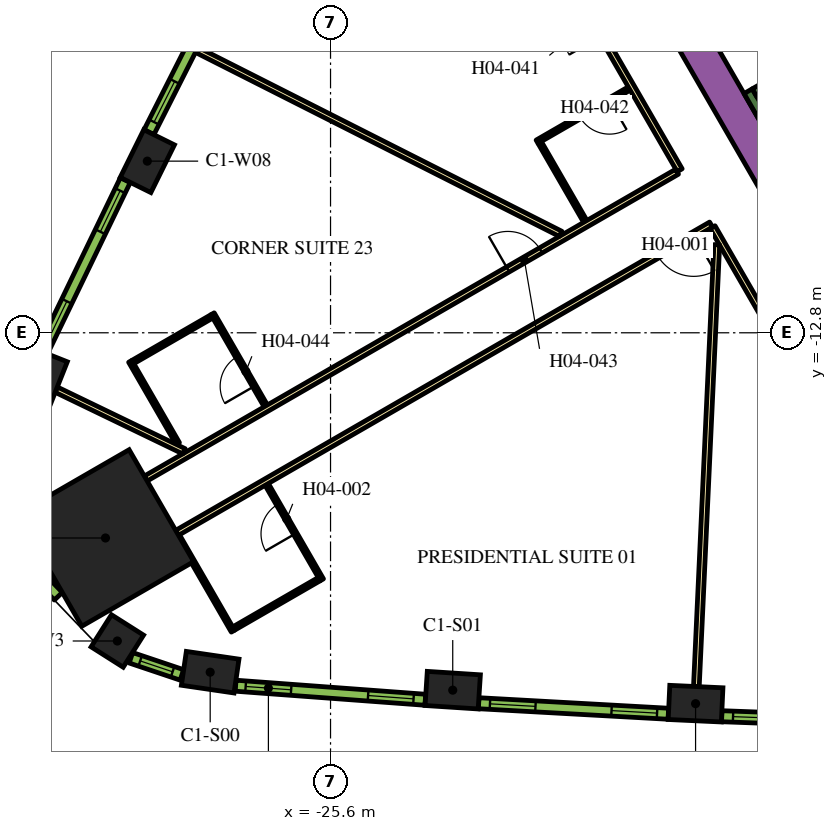
"""IFC4 building model, lengths in metres.
Left out: names, types, materials, properties, quantities, classifications, styles, units other than length and angle.
Written with IfcOpenShell. Run it as: python <this file> out.ifc"""

import sys

from ifc_helpers import new_model, si_unit, direction, frame, frame_2d, origin, origin_2d, place, context, subcontext, project, spatial, rectangle, extrude, element, fill, save


model = new_model("IFC4")
c1 = context("Model", 3, precision=1e-05, world=origin(), true_north=direction((0.0, 1.0)))
c2 = subcontext(c1, "Body", "Model", "MODEL_VIEW")
j1 = project(units=[si_unit("LENGTHUNIT", "METRE"), si_unit("PLANEANGLEUNIT", "RADIAN")], contexts=[c1])
p1 = place(None, origin())
s1 = spatial("IfcSite", under=j1, at=p1, CompositionType="ELEMENT")
p2 = place(p1, origin())
s2 = spatial("IfcBuilding", under=s1, at=p2, CompositionType="ELEMENT")
p3 = place(p2, frame((0.0, 0.0, 62.7)))
s3 = spatial("IfcBuildingStorey", under=s2, at=p3, CompositionType="ELEMENT", Elevation=62.7)
p4 = place(p3, frame((-31.522, -18.199, 0.0), z_axis=(0.0, 0.0, 1.0), x_axis=(-0.866025403784, -0.5, 0.0)))
e1 = element("IfcColumn", 1, at=p4, inside=s3, PredefinedType="COLUMN", context=c2, shape_type="SweptSolid", body=[
    extrude(rectangle(XDim=3.4, YDim=3.4, at=origin_2d()), origin(), (0.0, 0.0, 1.0), 3.9),
])
for number, where, z_axis, x_axis in (
    (2, (-28.767, -21.731, 0.0), (0.0, 0.0, 1.0), (0.989, -0.145, 0.0)),
    (3, (-22.385, -22.204, 0.0), (0.0, 0.0, 1.0), (0.998, -0.065, 0.0)),
    (4, (-15.994, -22.558, 0.0), (0.0, 0.0, 1.0), (0.999, -0.046, 0.0)),
    (5, (-30.421, -8.284, 0.0), (0.0, 0.0, 1.0), (-0.443, -0.897, 0.0)),
    (6, (-33.203, -14.047, 0.0), (0.0, 0.0, 1.0), (-0.369, -0.929, 0.0)),
):
    element("IfcColumn", number, at=place(p3, frame(where, z_axis=z_axis, x_axis=x_axis)), inside=s3, PredefinedType="COLUMN", context=c2, shape_type="SweptSolid", body=[
        extrude(rectangle(XDim=1.4, YDim=0.9, at=origin_2d()), origin(), (0.0, 0.0, 1.0), 3.9),
    ])
p5 = place(p3, frame((-31.21, -20.91, 0.0), z_axis=(0.0, 0.0, 1.0), x_axis=(0.844485001826, -0.535579202071, 0.0)))
e7 = element("IfcColumn", 7, at=p5, inside=s3, PredefinedType="COLUMN", context=c2, shape_type="SweptSolid", body=[
    extrude(rectangle(XDim=1.0, YDim=1.0, at=origin_2d()), origin(), (0.0, 0.0, 1.0), 3.9),
])
p6 = place(p3, frame((-12.134, -11.883, 0.0), z_axis=(0.0, 0.0, 1.0), x_axis=(-0.500005339912, 0.866022320763, 0.0)))
e8 = element("IfcWall", 8, at=p6, inside=s3, PredefinedType="SOLIDWALL", context=c2, shape_type="SweptSolid", body=[
    extrude(rectangle(XDim=9.488, YDim=0.9, at=frame_2d((4.744, 0.0))), origin(), (0.0, 0.0, 1.0), 3.9),
])
p7 = place(p3, frame((-12.885, -9.431, 0.0), z_axis=(0.0, 0.0, 1.0), x_axis=(-0.500020560727, 0.866013532718, 0.0)))
e9 = element("IfcWall", 9, at=p7, inside=s3, PredefinedType="SOLIDWALL", context=c2, shape_type="SweptSolid", body=[
    extrude(rectangle(XDim=3.45, YDim=0.25, at=frame_2d((1.725, 0.0))), origin(), (0.0, 0.0, 1.0), 3.9),
])
p8 = place(p3, frame((-14.44, -6.49, 0.0), z_axis=(0.0, 0.0, 1.0), x_axis=(0.866022966069, 0.500004222222, 0.0)))
e10 = element("IfcWall", 10, at=p8, inside=s3, PredefinedType="SOLIDWALL", context=c2, shape_type="SweptSolid", body=[
    extrude(rectangle(XDim=6.8, YDim=0.25, at=frame_2d((3.4, 0.0))), origin(), (0.0, 0.0, 1.0), 3.9),
])
p9 = place(p3, frame((-16.412, -8.523, 0.0), z_axis=(0.0, 0.0, 1.0), x_axis=(-0.500001929737, 0.866024289647, 0.0)))
e11 = element("IfcWall", 11, at=p9, inside=s3, PredefinedType="PARTITIONING", context=c2, shape_type="SweptSolid", body=[
    extrude(rectangle(XDim=5.268, YDim=0.15, at=frame_2d((2.634, 0.0))), origin(), (0.0, 0.0, 1.0), 2.75),
])
p10 = place(p9, frame((4.088, 0.0, 0.0)))
e12 = element("IfcOpeningElement", 12, at=p10, cuts=e11, PredefinedType="OPENING", context=c2, shape_type="SweptSolid", body=[
    extrude(rectangle(XDim=1.0, YDim=2.1, at=frame_2d((0.5, 1.05))), frame((0.0, 0.085, 0.0), z_axis=(0.0, -1.0, 0.0), x_axis=(1.0, 0.0, 0.0)), (0.0, 0.0, 1.0), 0.17),
])
p11 = place(p3, frame((-30.463, -16.635, 0.0), z_axis=(0.0, 0.0, 1.0), x_axis=(0.866022394896, 0.500005211512, 0.0)))
e13 = element("IfcWall", 13, at=p11, inside=s3, PredefinedType="PARTITIONING", context=c2, shape_type="SweptSolid", body=[
    extrude(rectangle(XDim=16.144, YDim=0.15, at=frame_2d((8.072, 0.0))), origin(), (0.0, 0.0, 1.0), 2.75),
])
p12 = place(p11, frame((11.004, 0.0, 0.0)))
e14 = element("IfcOpeningElement", 14, at=p12, cuts=e13, PredefinedType="OPENING", context=c2, shape_type="SweptSolid", body=[
    extrude(rectangle(XDim=1.0, YDim=2.1, at=frame_2d((0.5, 1.05))), frame((0.0, 0.085, 0.0), z_axis=(0.0, -1.0, 0.0), x_axis=(1.0, 0.0, 0.0)), (0.0, 0.0, 1.0), 0.17),
])
p13 = place(p3, frame((-15.587, -9.952, 0.0), z_axis=(0.0, 0.0, 1.0), x_axis=(-0.866022197818, -0.500005552856, 0.0)))
e15 = element("IfcWall", 15, at=p13, inside=s3, PredefinedType="PARTITIONING", context=c2, shape_type="SweptSolid", body=[
    extrude(rectangle(XDim=16.224, YDim=0.15, at=frame_2d((8.112, 0.0))), origin(), (0.0, 0.0, 1.0), 2.75),
])
p14 = place(p13, frame((0.527, 0.0, 0.0)))
e16 = element("IfcOpeningElement", 16, at=p14, cuts=e15, PredefinedType="OPENING", context=c2, shape_type="SweptSolid", body=[
    extrude(rectangle(XDim=1.1, YDim=2.1, at=frame_2d((0.55, 1.05))), frame((0.0, 0.085, 0.0), z_axis=(0.0, -1.0, 0.0), x_axis=(1.0, 0.0, 0.0)), (0.0, 0.0, 1.0), 0.17),
])
p15 = place(p3, frame((-12.918, -14.575, 0.0), z_axis=(0.0, 0.0, 1.0), x_axis=(-0.500009150678, 0.866020120573, 0.0)))
e17 = element("IfcWall", 17, at=p15, inside=s3, PredefinedType="PARTITIONING", context=c2, shape_type="SweptSolid", body=[
    extrude(rectangle(XDim=5.258, YDim=0.15, at=frame_2d((2.629, 0.0))), origin(), (0.0, 0.0, 1.0), 2.75),
])
p16 = place(p3, frame((-32.817, -14.296, 0.0), z_axis=(0.0, 0.0, 1.0), x_axis=(0.900616957918, -0.434613730927, 0.0)))
e18 = element("IfcWall", 18, at=p16, inside=s3, PredefinedType="PARTITIONING", context=c2, shape_type="SweptSolid", body=[
    extrude(rectangle(XDim=3.733, YDim=0.15, at=frame_2d((1.867, 0.0))), origin(), (0.0, 0.0, 1.0), 2.75),
])
p17 = place(p3, frame((-29.12, -5.356, 0.0), z_axis=(0.0, 0.0, 1.0), x_axis=(0.892401965553, -0.451241323327, 0.0)))
e19 = element("IfcWall", 19, at=p17, inside=s3, PredefinedType="PARTITIONING", context=c2, shape_type="SweptSolid", body=[
    extrude(rectangle(XDim=10.729, YDim=0.15, at=frame_2d((5.364, 0.0))), origin(), (0.0, 0.0, 1.0), 2.75),
])
p18 = place(p3, frame((-15.973, -22.109, 0.0), z_axis=(0.0, 0.0, 1.0), x_axis=(0.046191717129, 0.998932592955, 0.0)))
e20 = element("IfcWall", 20, at=p18, inside=s3, PredefinedType="PARTITIONING", context=c2, shape_type="SweptSolid", body=[
    extrude(rectangle(XDim=11.638, YDim=0.15, at=frame_2d((5.819, 0.0))), origin(), (0.0, 0.0, 1.0), 2.75),
])
p19 = place(p3, frame((-25.829, -19.3, 0.0), z_axis=(0.0, 0.0, 1.0), x_axis=(-0.50005036918, 0.865996321171, 0.0)))
e21 = element("IfcWall", 21, at=p19, inside=s3, PredefinedType="PARTITIONING", context=c2, shape_type="SweptSolid", body=[
    extrude(rectangle(XDim=2.9, YDim=0.1, at=frame_2d((1.45, 0.0))), origin(), (0.0, 0.0, 1.0), 2.75),
])
p20 = place(p19, frame((1.4, 0.0, 0.0)))
e22 = element("IfcOpeningElement", 22, at=p20, cuts=e21, PredefinedType="OPENING", context=c2, shape_type="SweptSolid", body=[
    extrude(rectangle(XDim=0.9, YDim=2.1, at=frame_2d((0.45, 1.05))), frame((0.0, 0.06, 0.0), z_axis=(0.0, -1.0, 0.0), x_axis=(1.0, 0.0, 0.0)), (0.0, 0.0, 1.0), 0.12),
])
p21 = place(p3, frame((-25.897, -19.282, 0.0), z_axis=(0.0, 0.0, 1.0), x_axis=(-0.866021400173, -0.500006934395, 0.0)))
e23 = element("IfcWall", 23, at=p21, inside=s3, PredefinedType="PARTITIONING", context=c2, shape_type="SweptSolid", body=[
    extrude(rectangle(XDim=2.6, YDim=0.1, at=frame_2d((1.3, 0.0))), origin(), (0.0, 0.0, 1.0), 2.75),
])
p22 = place(p3, frame((-29.617, -18.139, 0.0), z_axis=(0.0, 0.0, 1.0), x_axis=(0.499987231761, -0.866032775405, 0.0)))
e24 = element("IfcWall", 24, at=p22, inside=s3, PredefinedType="PARTITIONING", context=c2, shape_type="SweptSolid", body=[
    extrude(rectangle(XDim=2.9, YDim=0.1, at=frame_2d((1.45, 0.0))), origin(), (0.0, 0.0, 1.0), 2.75),
])
p23 = place(p3, frame((-17.74, -6.373, 0.0), z_axis=(0.0, 0.0, 1.0), x_axis=(-0.866018616679, -0.500011755427, 0.0)))
e25 = element("IfcWall", 25, at=p23, inside=s3, PredefinedType="PARTITIONING", context=c2, shape_type="SweptSolid", body=[
    extrude(rectangle(XDim=2.8, YDim=0.1, at=frame_2d((1.4, 0.0))), origin(), (0.0, 0.0, 1.0), 2.75),
])
p24 = place(p23, frame((0.6, 0.0, 0.0)))
e26 = element("IfcOpeningElement", 26, at=p24, cuts=e25, PredefinedType="OPENING", context=c2, shape_type="SweptSolid", body=[
    extrude(rectangle(XDim=0.9, YDim=2.1, at=frame_2d((0.45, 1.05))), frame((0.0, 0.06, 0.0), z_axis=(0.0, -1.0, 0.0), x_axis=(1.0, 0.0, 0.0)), (0.0, 0.0, 1.0), 0.12),
])
p25 = place(p3, frame((-20.092, -7.8, 0.0), z_axis=(0.0, 0.0, 1.0), x_axis=(0.499940577336, -0.866059708757, 0.0)))
e27 = element("IfcWall", 27, at=p25, inside=s3, PredefinedType="PARTITIONING", context=c2, shape_type="SweptSolid", body=[
    extrude(rectangle(XDim=2.39, YDim=0.1, at=frame_2d((1.195, 0.0))), origin(), (0.0, 0.0, 1.0), 2.75),
])
p26 = place(p3, frame((-27.304, -14.725, 0.0), z_axis=(0.0, 0.0, 1.0), x_axis=(-0.49998411664, 0.866034573852, 0.0)))
e28 = element("IfcWall", 28, at=p26, inside=s3, PredefinedType="PARTITIONING", context=c2, shape_type="SweptSolid", body=[
    extrude(rectangle(XDim=2.8, YDim=0.1, at=frame_2d((1.4, 0.0))), origin(), (0.0, 0.0, 1.0), 2.75),
])
p27 = place(p26, frame((0.6, 0.0, 0.0)))
e29 = element("IfcOpeningElement", 29, at=p27, cuts=e28, PredefinedType="OPENING", context=c2, shape_type="SweptSolid", body=[
    extrude(rectangle(XDim=0.9, YDim=2.1, at=frame_2d((0.45, 1.05))), frame((0.0, 0.06, 0.0), z_axis=(0.0, -1.0, 0.0), x_axis=(1.0, 0.0, 0.0)), (0.0, 0.0, 1.0), 0.12),
])
p28 = place(p3, frame((-28.722, -12.368, 0.0), z_axis=(0.0, 0.0, 1.0), x_axis=(-0.866050077142, -0.499957262057, 0.0)))
e30 = element("IfcWall", 30, at=p28, inside=s3, PredefinedType="PARTITIONING", context=c2, shape_type="SweptSolid", body=[
    extrude(rectangle(XDim=2.4, YDim=0.1, at=frame_2d((1.2, 0.0))), origin(), (0.0, 0.0, 1.0), 2.75),
])
p29 = place(p3, frame((-29.619, -15.715, 0.0), z_axis=(0.0, 0.0, 1.0), x_axis=(-0.500004234368, 0.866022959057, 0.0)))
e31 = element("IfcWall", 31, at=p29, inside=s3, PredefinedType="PARTITIONING", context=c2, shape_type="SweptSolid", body=[
    extrude(rectangle(XDim=2.5, YDim=0.1, at=frame_2d((1.25, 0.0))), origin(), (0.0, 0.0, 1.0), 2.75),
])
p30 = place(p3, frame((-28.098, -22.086, 0.0), z_axis=(0.0, 0.0, 1.0), x_axis=(0.997266290399, -0.073891447643, 0.0)))
e32 = element("IfcWall", 32, at=p30, inside=s3, PredefinedType="SOLIDWALL", context=c2, shape_type="SweptSolid", body=[
    extrude(rectangle(XDim=5.006, YDim=0.29, at=frame_2d((2.503, 0.0))), origin(), (0.0, 0.0, 1.0), 3.65),
])
p31 = place(p30, frame((0.265, 0.0, 0.9)))
e33 = element("IfcOpeningElement", 33, at=p31, cuts=e32, PredefinedType="OPENING", context=c2, shape_type="SweptSolid", body=[
    extrude(rectangle(XDim=1.2, YDim=2.15, at=frame_2d((0.6, 1.075))), frame((0.0, 0.155, 0.0), z_axis=(0.0, -1.0, 0.0), x_axis=(1.0, 0.0, 0.0)), (0.0, 0.0, 1.0), 0.31),
])
p32 = place(p30, frame((3.496, 0.0, 0.9)))
e34 = element("IfcOpeningElement", 34, at=p32, cuts=e32, PredefinedType="OPENING", context=c2, shape_type="SweptSolid", body=[
    extrude(rectangle(XDim=1.2, YDim=2.15, at=frame_2d((0.6, 1.075))), frame((0.0, 0.155, 0.0), z_axis=(0.0, -1.0, 0.0), x_axis=(1.0, 0.0, 0.0)), (0.0, 0.0, 1.0), 0.31),
])
p33 = place(p3, frame((-21.701, -22.547, 0.0), z_axis=(0.0, 0.0, 1.0), x_axis=(0.998464708705, -0.055391564976, 0.0)))
e35 = element("IfcWall", 35, at=p33, inside=s3, PredefinedType="SOLIDWALL", context=c2, shape_type="SweptSolid", body=[
    extrude(rectangle(XDim=4.998, YDim=0.29, at=frame_2d((2.499, 0.0))), origin(), (0.0, 0.0, 1.0), 3.65),
])
p34 = place(p33, frame((0.297, 0.0, 0.9)))
e36 = element("IfcOpeningElement", 36, at=p34, cuts=e35, PredefinedType="OPENING", context=c2, shape_type="SweptSolid", body=[
    extrude(rectangle(XDim=1.2, YDim=2.15, at=frame_2d((0.6, 1.075))), frame((0.0, 0.155, 0.0), z_axis=(0.0, -1.0, 0.0), x_axis=(1.0, 0.0, 0.0)), (0.0, 0.0, 1.0), 0.31),
])
p35 = place(p33, frame((3.501, 0.0, 0.9)))
e37 = element("IfcOpeningElement", 37, at=p35, cuts=e35, PredefinedType="OPENING", context=c2, shape_type="SweptSolid", body=[
    extrude(rectangle(XDim=1.2, YDim=2.15, at=frame_2d((0.6, 1.075))), frame((0.0, 0.155, 0.0), z_axis=(0.0, -1.0, 0.0), x_axis=(1.0, 0.0, 0.0)), (0.0, 0.0, 1.0), 0.31),
])
p36 = place(p3, frame((-15.305, -22.889, 0.0), z_axis=(0.0, 0.0, 1.0), x_axis=(0.999317974969, -0.036926750529, 0.0)))
e38 = element("IfcWall", 38, at=p36, inside=s3, PredefinedType="SOLIDWALL", context=c2, shape_type="SweptSolid", body=[
    extrude(rectangle(XDim=4.998, YDim=0.29, at=frame_2d((2.499, 0.0))), origin(), (0.0, 0.0, 1.0), 3.65),
])
p37 = place(p36, frame((0.297, 0.0, 0.9)))
e39 = element("IfcOpeningElement", 39, at=p37, cuts=e38, PredefinedType="OPENING", context=c2, shape_type="SweptSolid", body=[
    extrude(rectangle(XDim=1.2, YDim=2.15, at=frame_2d((0.6, 1.075))), frame((0.0, 0.155, 0.0), z_axis=(0.0, -1.0, 0.0), x_axis=(1.0, 0.0, 0.0)), (0.0, 0.0, 1.0), 0.31),
])
p38 = place(p36, frame((3.501, 0.0, 0.9)))
e40 = element("IfcOpeningElement", 40, at=p38, cuts=e38, PredefinedType="OPENING", context=c2, shape_type="SweptSolid", body=[
    extrude(rectangle(XDim=1.2, YDim=2.15, at=frame_2d((0.6, 1.075))), frame((0.0, 0.155, 0.0), z_axis=(0.0, -1.0, 0.0), x_axis=(1.0, 0.0, 0.0)), (0.0, 0.0, 1.0), 0.31),
])
p39 = place(p3, frame((-28.122, -3.06, 0.0), z_axis=(0.0, 0.0, 1.0), x_axis=(-0.451233929645, -0.892405704115, 0.0)))
e41 = element("IfcWall", 41, at=p39, inside=s3, PredefinedType="SOLIDWALL", context=c2, shape_type="SweptSolid", body=[
    extrude(rectangle(XDim=4.998, YDim=0.29, at=frame_2d((2.499, 0.0))), origin(), (0.0, 0.0, 1.0), 3.65),
])
p40 = place(p39, frame((0.297, 0.0, 0.9)))
e42 = element("IfcOpeningElement", 42, at=p40, cuts=e41, PredefinedType="OPENING", context=c2, shape_type="SweptSolid", body=[
    extrude(rectangle(XDim=1.2, YDim=2.15, at=frame_2d((0.6, 1.075))), frame((0.0, 0.155, 0.0), z_axis=(0.0, -1.0, 0.0), x_axis=(1.0, 0.0, 0.0)), (0.0, 0.0, 1.0), 0.31),
])
p41 = place(p39, frame((3.501, 0.0, 0.9)))
e43 = element("IfcOpeningElement", 43, at=p41, cuts=e41, PredefinedType="OPENING", context=c2, shape_type="SweptSolid", body=[
    extrude(rectangle(XDim=1.2, YDim=2.15, at=frame_2d((0.6, 1.075))), frame((0.0, 0.155, 0.0), z_axis=(0.0, -1.0, 0.0), x_axis=(1.0, 0.0, 0.0)), (0.0, 0.0, 1.0), 0.31),
])
p42 = place(p3, frame((-31.0, -8.782, 0.0), z_axis=(0.0, 0.0, 1.0), x_axis=(-0.434664499056, -0.900592456808, 0.0)))
e44 = element("IfcWall", 44, at=p42, inside=s3, PredefinedType="SOLIDWALL", context=c2, shape_type="SweptSolid", body=[
    extrude(rectangle(XDim=5.006, YDim=0.29, at=frame_2d((2.503, 0.0))), origin(), (0.0, 0.0, 1.0), 3.65),
])
p43 = place(p42, frame((0.31, 0.0, 0.9)))
e45 = element("IfcOpeningElement", 45, at=p43, cuts=e44, PredefinedType="OPENING", context=c2, shape_type="SweptSolid", body=[
    extrude(rectangle(XDim=1.2, YDim=2.15, at=frame_2d((0.6, 1.075))), frame((0.0, 0.155, 0.0), z_axis=(0.0, -1.0, 0.0), x_axis=(1.0, 0.0, 0.0)), (0.0, 0.0, 1.0), 0.31),
])
p44 = place(p42, frame((3.541, 0.0, 0.9)))
e46 = element("IfcOpeningElement", 46, at=p44, cuts=e44, PredefinedType="OPENING", context=c2, shape_type="SweptSolid", body=[
    extrude(rectangle(XDim=1.2, YDim=2.15, at=frame_2d((0.6, 1.075))), frame((0.0, 0.155, 0.0), z_axis=(0.0, -1.0, 0.0), x_axis=(1.0, 0.0, 0.0)), (0.0, 0.0, 1.0), 0.31),
])
p45 = place(p3, frame((-33.291, -19.181, 0.0), z_axis=(0.0, 0.0, 1.0), x_axis=(0.692252359589, -0.721655506903, 0.0)))
e47 = element("IfcWall", 47, at=p45, inside=s3, PredefinedType="SOLIDWALL", context=c2, shape_type="SweptSolid", body=[
    extrude(rectangle(XDim=0.764, YDim=0.29, at=frame_2d((0.382, 0.0))), origin(), (0.0, 0.0, 1.0), 3.65),
])
p46 = place(p3, frame((-30.853, -21.352, 0.0), z_axis=(0.0, 0.0, 1.0), x_axis=(0.947903891592, -0.318556450734, 0.0)))
e48 = element("IfcWall", 48, at=p46, inside=s3, PredefinedType="SOLIDWALL", context=c2, shape_type="SweptSolid", body=[
    extrude(rectangle(XDim=1.415, YDim=0.29, at=frame_2d((0.708, 0.0))), origin(), (0.0, 0.0, 1.0), 3.65),
])
p47 = place(p46, frame((0.257, 0.0, 0.9)))
e49 = element("IfcOpeningElement", 49, at=p47, cuts=e48, PredefinedType="OPENING", context=c2, shape_type="SweptSolid", body=[
    extrude(rectangle(XDim=0.9, YDim=2.15, at=frame_2d((0.45, 1.075))), frame((0.0, 0.155, 0.0), z_axis=(0.0, -1.0, 0.0), x_axis=(1.0, 0.0, 0.0)), (0.0, 0.0, 1.0), 0.31),
])
p48 = place(p14, origin())
e50 = element("IfcDoor", 50, at=p48, inside=s3, OperationType="SINGLE_SWING_LEFT", PredefinedType="DOOR", context=c2, shape_type="SweptSolid", body=[
    extrude(rectangle(XDim=1.1, YDim=2.1, at=frame_2d((0.55, 1.05))), frame((0.0, 0.025, 0.0), z_axis=(0.0, -1.0, 0.0), x_axis=(1.0, 0.0, 0.0)), (0.0, 0.0, 1.0), 0.05),
])
fill(e16, e50)
p49 = place(p20, origin())
e51 = element("IfcDoor", 51, at=p49, inside=s3, OperationType="SINGLE_SWING_LEFT", PredefinedType="DOOR", context=c2, shape_type="SweptSolid", body=[
    extrude(rectangle(XDim=0.9, YDim=2.1, at=frame_2d((0.45, 1.05))), frame((0.0, 0.025, 0.0), z_axis=(0.0, -1.0, 0.0), x_axis=(1.0, 0.0, 0.0)), (0.0, 0.0, 1.0), 0.05),
])
fill(e22, e51)
p50 = place(p24, origin())
e52 = element("IfcDoor", 52, at=p50, inside=s3, OperationType="SINGLE_SWING_LEFT", PredefinedType="DOOR", context=c2, shape_type="SweptSolid", body=[
    extrude(rectangle(XDim=0.9, YDim=2.1, at=frame_2d((0.45, 1.05))), frame((0.0, 0.025, 0.0), z_axis=(0.0, -1.0, 0.0), x_axis=(1.0, 0.0, 0.0)), (0.0, 0.0, 1.0), 0.05),
])
fill(e26, e52)
p51 = place(p12, origin())
e53 = element("IfcDoor", 53, at=p51, inside=s3, OperationType="SINGLE_SWING_RIGHT", PredefinedType="DOOR", context=c2, shape_type="SweptSolid", body=[
    extrude(rectangle(XDim=1.0, YDim=2.1, at=frame_2d((0.5, 1.05))), frame((0.0, 0.025, 0.0), z_axis=(0.0, -1.0, 0.0), x_axis=(1.0, 0.0, 0.0)), (0.0, 0.0, 1.0), 0.05),
])
fill(e14, e53)
p52 = place(p27, origin())
e54 = element("IfcDoor", 54, at=p52, inside=s3, OperationType="SINGLE_SWING_LEFT", PredefinedType="DOOR", context=c2, shape_type="SweptSolid", body=[
    extrude(rectangle(XDim=0.9, YDim=2.1, at=frame_2d((0.45, 1.05))), frame((0.0, 0.025, 0.0), z_axis=(0.0, -1.0, 0.0), x_axis=(1.0, 0.0, 0.0)), (0.0, 0.0, 1.0), 0.05),
])
fill(e29, e54)
p53 = place(p31, origin())
e55 = element("IfcWindow", 55, at=p53, inside=s3, PartitioningType="DOUBLE_PANEL_VERTICAL", PredefinedType="WINDOW", context=c2, shape_type="SweptSolid", body=[
    extrude(rectangle(XDim=1.2, YDim=2.15, at=frame_2d((0.6, 1.075))), frame((0.0, 0.015, 0.0), z_axis=(0.0, -1.0, 0.0), x_axis=(1.0, 0.0, 0.0)), (0.0, 0.0, 1.0), 0.06),
])
fill(e33, e55)
p54 = place(p32, origin())
e56 = element("IfcWindow", 56, at=p54, inside=s3, PartitioningType="DOUBLE_PANEL_VERTICAL", PredefinedType="WINDOW", context=c2, shape_type="SweptSolid", body=[
    extrude(rectangle(XDim=1.2, YDim=2.15, at=frame_2d((0.6, 1.075))), frame((0.0, 0.015, 0.0), z_axis=(0.0, -1.0, 0.0), x_axis=(1.0, 0.0, 0.0)), (0.0, 0.0, 1.0), 0.06),
])
fill(e34, e56)
p55 = place(p34, origin())
e57 = element("IfcWindow", 57, at=p55, inside=s3, PartitioningType="DOUBLE_PANEL_VERTICAL", PredefinedType="WINDOW", context=c2, shape_type="SweptSolid", body=[
    extrude(rectangle(XDim=1.2, YDim=2.15, at=frame_2d((0.6, 1.075))), frame((0.0, 0.015, 0.0), z_axis=(0.0, -1.0, 0.0), x_axis=(1.0, 0.0, 0.0)), (0.0, 0.0, 1.0), 0.06),
])
fill(e36, e57)
p56 = place(p35, origin())
e58 = element("IfcWindow", 58, at=p56, inside=s3, PartitioningType="DOUBLE_PANEL_VERTICAL", PredefinedType="WINDOW", context=c2, shape_type="SweptSolid", body=[
    extrude(rectangle(XDim=1.2, YDim=2.15, at=frame_2d((0.6, 1.075))), frame((0.0, 0.015, 0.0), z_axis=(0.0, -1.0, 0.0), x_axis=(1.0, 0.0, 0.0)), (0.0, 0.0, 1.0), 0.06),
])
fill(e37, e58)
p57 = place(p37, origin())
e59 = element("IfcWindow", 59, at=p57, inside=s3, PartitioningType="DOUBLE_PANEL_VERTICAL", PredefinedType="WINDOW", context=c2, shape_type="SweptSolid", body=[
    extrude(rectangle(XDim=1.2, YDim=2.15, at=frame_2d((0.6, 1.075))), frame((0.0, 0.015, 0.0), z_axis=(0.0, -1.0, 0.0), x_axis=(1.0, 0.0, 0.0)), (0.0, 0.0, 1.0), 0.06),
])
fill(e39, e59)
p58 = place(p41, origin())
e60 = element("IfcWindow", 60, at=p58, inside=s3, PartitioningType="DOUBLE_PANEL_VERTICAL", PredefinedType="WINDOW", context=c2, shape_type="SweptSolid", body=[
    extrude(rectangle(XDim=1.2, YDim=2.15, at=frame_2d((0.6, 1.075))), frame((0.0, 0.015, 0.0), z_axis=(0.0, -1.0, 0.0), x_axis=(1.0, 0.0, 0.0)), (0.0, 0.0, 1.0), 0.06),
])
fill(e43, e60)
p59 = place(p43, origin())
e61 = element("IfcWindow", 61, at=p59, inside=s3, PartitioningType="DOUBLE_PANEL_VERTICAL", PredefinedType="WINDOW", context=c2, shape_type="SweptSolid", body=[
    extrude(rectangle(XDim=1.2, YDim=2.15, at=frame_2d((0.6, 1.075))), frame((0.0, 0.015, 0.0), z_axis=(0.0, -1.0, 0.0), x_axis=(1.0, 0.0, 0.0)), (0.0, 0.0, 1.0), 0.06),
])
fill(e45, e61)
p60 = place(p44, origin())
e62 = element("IfcWindow", 62, at=p60, inside=s3, PartitioningType="DOUBLE_PANEL_VERTICAL", PredefinedType="WINDOW", context=c2, shape_type="SweptSolid", body=[
    extrude(rectangle(XDim=1.2, YDim=2.15, at=frame_2d((0.6, 1.075))), frame((0.0, 0.015, 0.0), z_axis=(0.0, -1.0, 0.0), x_axis=(1.0, 0.0, 0.0)), (0.0, 0.0, 1.0), 0.06),
])
fill(e46, e62)
p61 = place(p47, origin())
e63 = element("IfcWindow", 63, at=p61, inside=s3, PartitioningType="SINGLE_PANEL", PredefinedType="WINDOW", context=c2, shape_type="SweptSolid", body=[
    extrude(rectangle(XDim=0.9, YDim=2.15, at=frame_2d((0.45, 1.075))), frame((0.0, 0.015, 0.0), z_axis=(0.0, -1.0, 0.0), x_axis=(1.0, 0.0, 0.0)), (0.0, 0.0, 1.0), 0.06),
])
fill(e49, e63)
save(model, sys.argv[1])
